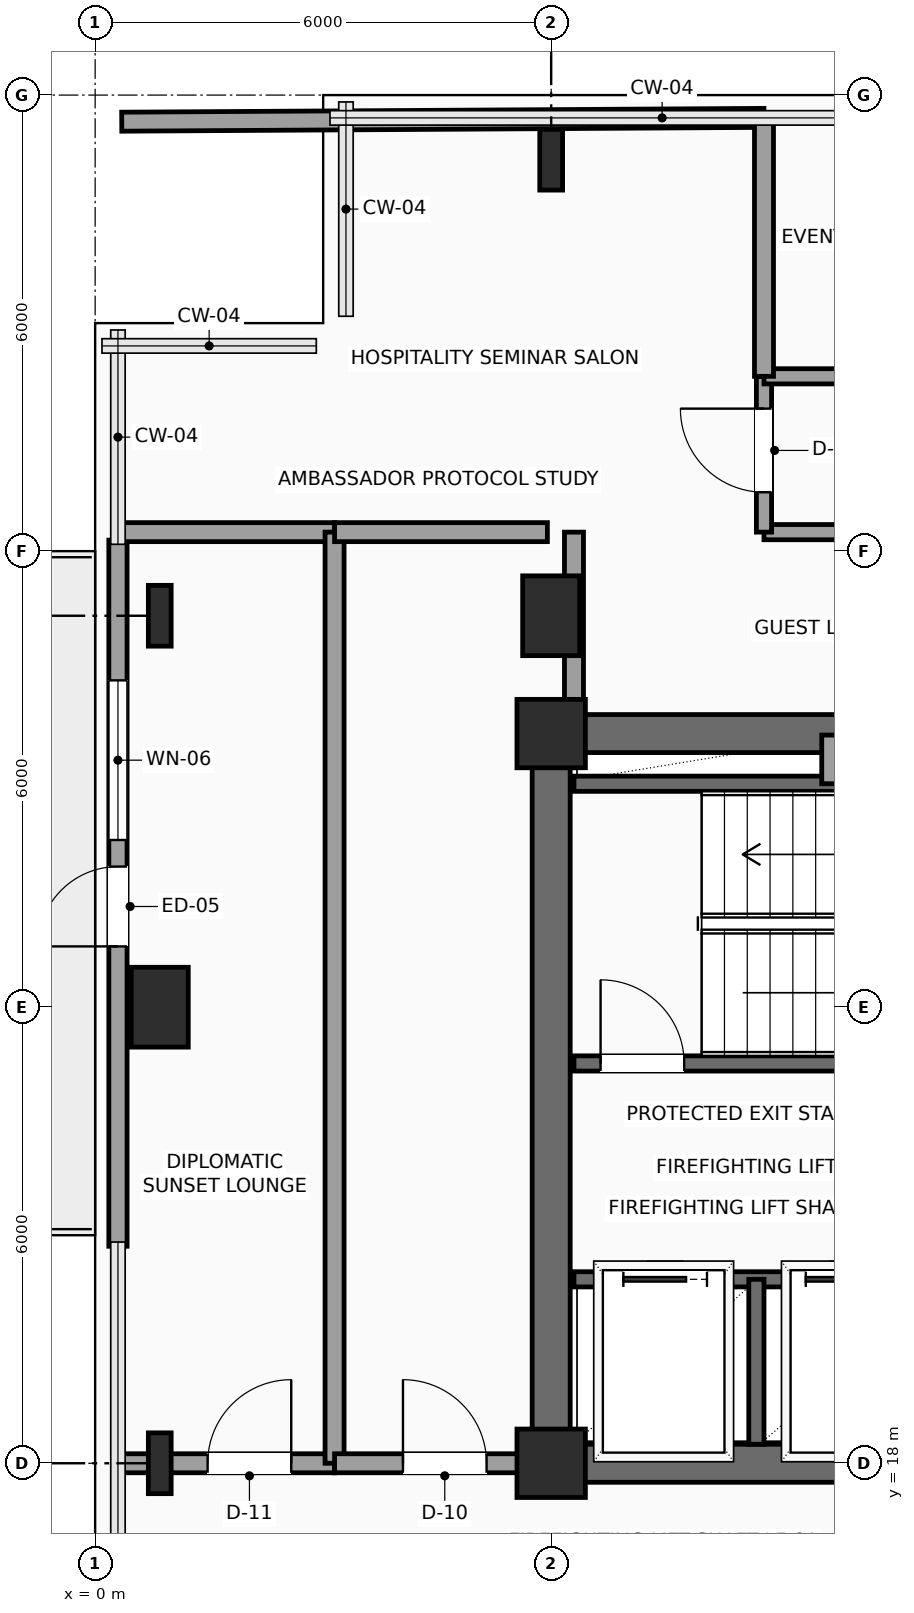
"""IFC4 building model, lengths in metres.
Left out: names, types, materials, properties, quantities, classifications, styles, units other than length and angle.
Written with IfcOpenShell. Run it as: python <this file> out.ifc"""

import sys

from ifc_helpers import new_model, si_unit, direction, frame, frame_2d, origin, origin_2d, place, context, subcontext, project, spatial, rectangle, i_section, extrude, element, fill, save


model = new_model("IFC4")
c1 = context("Model", 3, precision=1e-05, world=origin(), true_north=direction((0.0, 1.0)))
c2 = subcontext(c1, "Body", "Model", "MODEL_VIEW")
j1 = project(units=[si_unit("LENGTHUNIT", "METRE"), si_unit("PLANEANGLEUNIT", "RADIAN")], contexts=[c1])
p1 = place(None, origin())
s1 = spatial("IfcSite", under=j1, at=p1, CompositionType="ELEMENT")
p2 = place(p1, origin())
s2 = spatial("IfcBuilding", under=s1, at=p2, CompositionType="ELEMENT")
p3 = place(p2, frame((0.0, 0.0, 180.45)))
s3 = spatial("IfcBuildingStorey", under=s2, at=p3, CompositionType="ELEMENT", Elevation=180.45)
for number, where, z_axis, x_axis in (
    (1, (6.0, 18.0, 0.0), (0.0, 0.0, 1.0), (1.0, 0.0, 0.0)),
    (2, (6.0, 27.6, 0.0), (0.0, 0.0, 1.0), (1.0, 0.0, 0.0)),
):
    element("IfcColumn", number, at=place(p3, frame(where, z_axis=z_axis, x_axis=x_axis)), inside=s3, PredefinedType="COLUMN", context=c2, shape_type="SweptSolid", body=[
        extrude(rectangle(XDim=0.9, YDim=0.9, at=origin_2d()), origin(), (0.0, 0.0, 1.0), 3.75),
    ])
p4 = place(p3, frame((0.85, 18.0, 0.0), z_axis=(0.0, 0.0, 1.0), x_axis=(1.0, 0.0, 0.0)))
e3 = element("IfcColumn", 3, at=p4, inside=s3, PredefinedType="COLUMN", context=c2, shape_type="SweptSolid", body=[
    extrude(i_section(OverallWidth=0.3, OverallDepth=0.8, WebThickness=0.018, FlangeThickness=0.033, FilletRadius=0.03, at=origin_2d()), origin(), (0.0, 0.0, 1.0), 3.75),
])
p5 = place(p3, frame((0.85, 24.0, 0.0), z_axis=(0.0, 0.0, 1.0), x_axis=(1.0, 0.0, 0.0)))
e4 = element("IfcColumn", 4, at=p5, inside=s3, PredefinedType="COLUMN", context=c2, shape_type="SweptSolid", body=[
    extrude(rectangle(XDim=0.75, YDim=1.05, at=origin_2d()), origin(), (0.0, 0.0, 1.0), 3.75),
])
p6 = place(p3, frame((0.85, 29.15, 0.0), z_axis=(0.0, 0.0, 1.0), x_axis=(1.0, 0.0, 0.0)))
e5 = element("IfcColumn", 5, at=p6, inside=s3, PredefinedType="COLUMN", context=c2, shape_type="SweptSolid", body=[
    extrude(i_section(OverallWidth=0.3, OverallDepth=0.8, WebThickness=0.018, FlangeThickness=0.033, FilletRadius=0.03, at=origin_2d()), origin(), (0.0, 0.0, 1.0), 3.75),
])
p7 = place(p3, frame((6.0, 29.15, 0.0), z_axis=(0.0, 0.0, 1.0), x_axis=(1.0, 0.0, 0.0)))
e6 = element("IfcColumn", 6, at=p7, inside=s3, PredefinedType="COLUMN", context=c2, shape_type="SweptSolid", body=[
    extrude(rectangle(XDim=0.75, YDim=1.05, at=origin_2d()), origin(), (0.0, 0.0, 1.0), 3.75),
])
p8 = place(p3, frame((6.0, 35.15, 0.0), z_axis=(0.0, 0.0, 1.0), x_axis=(1.0, 0.0, 0.0)))
e7 = element("IfcColumn", 7, at=p8, inside=s3, PredefinedType="COLUMN", context=c2, shape_type="SweptSolid", body=[
    extrude(i_section(OverallWidth=0.3, OverallDepth=0.8, WebThickness=0.018, FlangeThickness=0.033, FilletRadius=0.03, at=origin_2d()), origin(), (0.0, 0.0, 1.0), 3.75),
])
p9 = place(p3, frame((0.3, 20.855, 0.0), z_axis=(0.0, 0.0, 1.0), x_axis=(0.0, 1.0, 0.0)))
e8 = element("IfcWall", 8, at=p9, inside=s3, PredefinedType="SOLIDWALL", context=c2, shape_type="SweptSolid", body=[
    extrude(rectangle(XDim=9.29, YDim=0.24, at=frame_2d((4.645, 0.0))), origin(), (0.0, 0.0, 1.0), 3.54),
])
p10 = place(p9, frame((3.945, 0.0, 0.0)))
e9 = element("IfcOpeningElement", 9, at=p10, cuts=e8, PredefinedType="OPENING", context=c2, shape_type="SweptSolid", body=[
    extrude(rectangle(XDim=1.05, YDim=2.2, at=frame_2d((0.525, 1.1))), frame((0.0, 0.13, 0.0), z_axis=(0.0, -1.0, 0.0), x_axis=(1.0, 0.0, 0.0)), (0.0, 0.0, 1.0), 0.26),
])
p11 = place(p9, frame((5.345, 0.0, 0.85)))
e10 = element("IfcOpeningElement", 10, at=p11, cuts=e8, PredefinedType="OPENING", context=c2, shape_type="SweptSolid", body=[
    extrude(rectangle(XDim=2.1, YDim=2.2, at=frame_2d((1.05, 1.1))), frame((0.0, 0.13, 0.0), z_axis=(0.0, -1.0, 0.0), x_axis=(1.0, 0.0, 0.0)), (0.0, 0.0, 1.0), 0.26),
])
p12 = place(p3, frame((6.0, 18.0, 0.0), z_axis=(0.0, 0.0, 1.0), x_axis=(1.0, 0.0, 0.0)))
e11 = element("IfcWall", 11, at=p12, inside=s3, PredefinedType="SHEAR", context=c2, shape_type="SweptSolid", body=[
    extrude(rectangle(XDim=12.0, YDim=0.5, at=frame_2d((6.0, 0.0))), origin(), (0.0, 0.0, 1.0), 3.54),
])
p13 = place(p12, frame((7.15, 0.0, 0.0)))
e12 = element("IfcOpeningElement", 12, at=p13, cuts=e11, PredefinedType="OPENING", context=c2, shape_type="SweptSolid", body=[
    extrude(rectangle(XDim=1.6, YDim=2.3, at=frame_2d((0.8, 1.15))), frame((0.0, 0.26, 0.0), z_axis=(0.0, -1.0, 0.0), x_axis=(1.0, 0.0, 0.0)), (0.0, 0.0, 1.0), 0.52),
])
p14 = place(p3, frame((6.0, 27.6, 0.0), z_axis=(0.0, 0.0, 1.0), x_axis=(1.0, 0.0, 0.0)))
e13 = element("IfcWall", 13, at=p14, inside=s3, PredefinedType="SHEAR", context=c2, shape_type="SweptSolid", body=[
    extrude(rectangle(XDim=12.0, YDim=0.5, at=frame_2d((6.0, 0.0))), origin(), (0.0, 0.0, 1.0), 3.54),
])
p15 = place(p14, frame((10.2, 0.0, 0.0)))
e14 = element("IfcOpeningElement", 14, at=p15, cuts=e13, PredefinedType="OPENING", context=c2, shape_type="SweptSolid", body=[
    extrude(rectangle(XDim=0.9, YDim=2.15, at=frame_2d((0.45, 1.075))), frame((0.0, 0.26, 0.0), z_axis=(0.0, -1.0, 0.0), x_axis=(1.0, 0.0, 0.0)), (0.0, 0.0, 1.0), 0.52),
])
p16 = place(p3, frame((6.0, 18.0, 0.0), z_axis=(0.0, 0.0, 1.0), x_axis=(0.0, 1.0, 0.0)))
e15 = element("IfcWall", 15, at=p16, inside=s3, PredefinedType="SHEAR", context=c2, shape_type="SweptSolid", body=[
    extrude(rectangle(XDim=9.6, YDim=0.5, at=frame_2d((4.8, 0.0))), origin(), (0.0, 0.0, 1.0), 3.54),
])
p17 = place(p3, frame((6.3, 23.26, 0.0), z_axis=(0.0, 0.0, 1.0), x_axis=(1.0, 0.0, 0.0)))
e16 = element("IfcWall", 16, at=p17, inside=s3, PredefinedType="SHEAR", context=c2, shape_type="SweptSolid", body=[
    extrude(rectangle(XDim=8.88, YDim=0.2, at=frame_2d((4.44, 0.0))), origin(), (0.0, 0.0, 1.0), 3.54),
])
p18 = place(p17, frame((0.35, 0.0, 0.0)))
e17 = element("IfcOpeningElement", 17, at=p18, cuts=e16, PredefinedType="OPENING", context=c2, shape_type="SweptSolid", body=[
    extrude(rectangle(XDim=1.1, YDim=2.2, at=frame_2d((0.55, 1.1))), frame((0.0, 0.11, 0.0), z_axis=(0.0, -1.0, 0.0), x_axis=(1.0, 0.0, 0.0)), (0.0, 0.0, 1.0), 0.22),
])
p19 = place(p3, frame((6.3, 26.94, 0.0), z_axis=(0.0, 0.0, 1.0), x_axis=(1.0, 0.0, 0.0)))
e18 = element("IfcWall", 18, at=p19, inside=s3, PredefinedType="SHEAR", context=c2, shape_type="SweptSolid", body=[
    extrude(rectangle(XDim=8.88, YDim=0.2, at=frame_2d((4.44, 0.0))), origin(), (0.0, 0.0, 1.0), 3.54),
])
p20 = place(p3, frame((6.3, 20.42, 0.0), z_axis=(0.0, 0.0, 1.0), x_axis=(1.0, 0.0, 0.0)))
e19 = element("IfcWall", 19, at=p20, inside=s3, PredefinedType="SHEAR", context=c2, shape_type="SweptSolid", body=[
    extrude(rectangle(XDim=4.95, YDim=0.2, at=frame_2d((2.475, 0.0))), origin(), (0.0, 0.0, 1.0), 3.54),
])
p21 = place(p20, frame((0.65, 0.0, 0.0)))
e20 = element("IfcOpeningElement", 20, at=p21, cuts=e19, PredefinedType="OPENING", context=c2, shape_type="SweptSolid", body=[
    extrude(rectangle(XDim=1.1, YDim=2.2, at=frame_2d((0.55, 1.1))), frame((0.0, 0.11, 0.0), z_axis=(0.0, -1.0, 0.0), x_axis=(1.0, 0.0, 0.0)), (0.0, 0.0, 1.0), 0.22),
])
p22 = place(p20, frame((3.05, 0.0, 0.0)))
e21 = element("IfcOpeningElement", 21, at=p22, cuts=e19, PredefinedType="OPENING", context=c2, shape_type="SweptSolid", body=[
    extrude(rectangle(XDim=1.1, YDim=2.2, at=frame_2d((0.55, 1.1))), frame((0.0, 0.11, 0.0), z_axis=(0.0, -1.0, 0.0), x_axis=(1.0, 0.0, 0.0)), (0.0, 0.0, 1.0), 0.22),
])
p23 = place(p3, frame((8.7, 18.25, 0.0), z_axis=(0.0, 0.0, 1.0), x_axis=(0.0, 1.0, 0.0)))
e22 = element("IfcWall", 22, at=p23, inside=s3, PredefinedType="SHEAR", context=c2, shape_type="SweptSolid", body=[
    extrude(rectangle(XDim=2.17, YDim=0.2, at=frame_2d((1.085, 0.0))), origin(), (0.0, 0.0, 1.0), 3.54),
])
p24 = place(p3, frame((9.66, 26.94, 0.0), z_axis=(0.0, 0.0, 1.0), x_axis=(0.0, 1.0, 0.0)))
e23 = element("IfcWall", 23, at=p24, inside=s3, PredefinedType="SOLIDWALL", context=c2, shape_type="SweptSolid", body=[
    extrude(rectangle(XDim=0.64, YDim=0.2, at=frame_2d((0.32, 0.0))), origin(), (0.0, 0.0, 1.0), 3.54),
])
p25 = place(p3, frame((15.88, 30.25, 0.0), z_axis=(0.0, 0.0, 1.0), x_axis=(-1.0, 0.0, 0.0)))
e24 = element("IfcWall", 24, at=p25, inside=s3, PredefinedType="SOLIDWALL", context=c2, shape_type="SweptSolid", body=[
    extrude(rectangle(XDim=7.08, YDim=0.2, at=frame_2d((3.54, 0.0))), origin(), (0.0, 0.0, 1.0), 3.54),
])
p26 = place(p25, frame((2.11, 0.0, 0.0)))
e25 = element("IfcOpeningElement", 25, at=p26, cuts=e24, PredefinedType="OPENING", context=c2, shape_type="SweptSolid", body=[
    extrude(rectangle(XDim=1.1, YDim=2.25, at=frame_2d((0.55, 1.125))), frame((0.0, 0.11, 0.0), z_axis=(0.0, -1.0, 0.0), x_axis=(1.0, 0.0, 0.0)), (0.0, 0.0, 1.0), 0.22),
])
p27 = place(p3, frame((8.8, 30.25, 0.0), z_axis=(0.0, 0.0, 1.0), x_axis=(0.0, 1.0, 0.0)))
e26 = element("IfcWall", 26, at=p27, inside=s3, PredefinedType="SOLIDWALL", context=c2, shape_type="SweptSolid", body=[
    extrude(rectangle(XDim=2.05, YDim=0.2, at=frame_2d((1.025, 0.0))), origin(), (0.0, 0.0, 1.0), 3.54),
])
p28 = place(p27, frame((0.525, 0.0, 0.0)))
e27 = element("IfcOpeningElement", 27, at=p28, cuts=e26, PredefinedType="OPENING", context=c2, shape_type="SweptSolid", body=[
    extrude(rectangle(XDim=1.1, YDim=2.25, at=frame_2d((0.55, 1.125))), frame((0.0, 0.11, 0.0), z_axis=(0.0, -1.0, 0.0), x_axis=(1.0, 0.0, 0.0)), (0.0, 0.0, 1.0), 0.22),
])
p29 = place(p3, frame((8.8, 32.3, 0.0), z_axis=(0.0, 0.0, 1.0), x_axis=(1.0, 0.0, 0.0)))
e28 = element("IfcWall", 28, at=p29, inside=s3, PredefinedType="SOLIDWALL", context=c2, shape_type="SweptSolid", body=[
    extrude(rectangle(XDim=6.2, YDim=0.2, at=frame_2d((3.1, 0.0))), origin(), (0.0, 0.0, 1.0), 3.132),
])
p30 = place(p29, frame((2.6, 0.0, 0.0)))
e29 = element("IfcOpeningElement", 29, at=p30, cuts=e28, PredefinedType="OPENING", context=c2, shape_type="SweptSolid", body=[
    extrude(rectangle(XDim=1.1, YDim=2.25, at=frame_2d((0.55, 1.125))), frame((0.0, 0.11, 0.0), z_axis=(0.0, -1.0, 0.0), x_axis=(1.0, 0.0, 0.0)), (0.0, 0.0, 1.0), 0.22),
])
p31 = place(p3, frame((0.3, 18.0, 0.0), z_axis=(0.0, 0.0, 1.0), x_axis=(1.0, 0.0, 0.0)))
e30 = element("IfcWall", 30, at=p31, inside=s3, PredefinedType="PARTITIONING", context=c2, shape_type="SweptSolid", body=[
    extrude(rectangle(XDim=2.85, YDim=0.25, at=frame_2d((1.425, 0.0))), origin(), (0.0, 0.0, 1.0), 3.132),
])
p32 = place(p31, frame((1.18, 0.0, 0.0)))
e31 = element("IfcOpeningElement", 31, at=p32, cuts=e30, PredefinedType="OPENING", context=c2, shape_type="SweptSolid", body=[
    extrude(rectangle(XDim=1.1, YDim=2.25, at=frame_2d((0.55, 1.125))), frame((0.0, 0.135, 0.0), z_axis=(0.0, -1.0, 0.0), x_axis=(1.0, 0.0, 0.0)), (0.0, 0.0, 1.0), 0.27),
])
p33 = place(p3, frame((0.3, 30.25, 0.0), z_axis=(0.0, 0.0, 1.0), x_axis=(1.0, 0.0, 0.0)))
e32 = element("IfcWall", 32, at=p33, inside=s3, PredefinedType="PARTITIONING", context=c2, shape_type="SweptSolid", body=[
    extrude(rectangle(XDim=2.85, YDim=0.25, at=frame_2d((1.425, 0.0))), origin(), (0.0, 0.0, 1.0), 3.54),
])
p34 = place(p3, frame((3.15, 18.0, 0.0), z_axis=(0.0, 0.0, 1.0), x_axis=(0.0, 1.0, 0.0)))
e33 = element("IfcWall", 33, at=p34, inside=s3, PredefinedType="PARTITIONING", context=c2, shape_type="SweptSolid", body=[
    extrude(rectangle(XDim=12.25, YDim=0.25, at=frame_2d((6.125, 0.0))), origin(), (0.0, 0.0, 1.0), 3.54),
])
p35 = place(p3, frame((3.15, 18.0, 0.0), z_axis=(0.0, 0.0, 1.0), x_axis=(1.0, 0.0, 0.0)))
e34 = element("IfcWall", 34, at=p35, inside=s3, PredefinedType="PARTITIONING", context=c2, shape_type="SweptSolid", body=[
    extrude(rectangle(XDim=2.8, YDim=0.25, at=frame_2d((1.4, 0.0))), origin(), (0.0, 0.0, 1.0), 3.132),
])
p36 = place(p35, frame((0.9, 0.0, 0.0)))
e35 = element("IfcOpeningElement", 35, at=p36, cuts=e34, PredefinedType="OPENING", context=c2, shape_type="SweptSolid", body=[
    extrude(rectangle(XDim=1.1, YDim=2.25, at=frame_2d((0.55, 1.125))), frame((0.0, 0.135, 0.0), z_axis=(0.0, -1.0, 0.0), x_axis=(1.0, 0.0, 0.0)), (0.0, 0.0, 1.0), 0.27),
])
p37 = place(p3, frame((3.15, 30.25, 0.0), z_axis=(0.0, 0.0, 1.0), x_axis=(1.0, 0.0, 0.0)))
e36 = element("IfcWall", 36, at=p37, inside=s3, PredefinedType="PARTITIONING", context=c2, shape_type="SweptSolid", body=[
    extrude(rectangle(XDim=2.8, YDim=0.25, at=frame_2d((1.4, 0.0))), origin(), (0.0, 0.0, 1.0), 3.54),
])
p38 = place(p3, frame((6.3, 27.65, 0.0), z_axis=(0.0, 0.0, 1.0), x_axis=(0.0, 1.0, 0.0)))
e37 = element("IfcWall", 37, at=p38, inside=s3, PredefinedType="PARTITIONING", context=c2, shape_type="SweptSolid", body=[
    extrude(rectangle(XDim=2.6, YDim=0.25, at=frame_2d((1.3, 0.0))), origin(), (0.0, 0.0, 1.0), 3.132),
])
p39 = place(p3, frame((0.35, 35.65, 0.0), z_axis=(0.0, 0.0, 1.0), x_axis=(0.99998245966, 0.005922868574, 0.0)))
e38 = element("IfcWall", 38, at=p39, inside=s3, PredefinedType="PARTITIONING", context=c2, shape_type="SweptSolid", body=[
    extrude(rectangle(XDim=8.45, YDim=0.25, at=frame_2d((4.225, 0.0))), origin(), (0.0, 0.0, 1.0), 3.54),
])
p40 = place(p3, frame((8.8, 32.3, 0.0), z_axis=(0.0, 0.0, 1.0), x_axis=(0.0, 1.0, 0.0)))
e39 = element("IfcWall", 39, at=p40, inside=s3, PredefinedType="PARTITIONING", context=c2, shape_type="SweptSolid", body=[
    extrude(rectangle(XDim=3.4, YDim=0.25, at=frame_2d((1.7, 0.0))), origin(), (0.0, 0.0, 1.0), 3.54),
])
p41 = place(p10, origin())
e40 = element("IfcDoor", 40, at=p41, inside=s3, OperationType="SINGLE_SWING_LEFT", PredefinedType="DOOR", context=c2, shape_type="SweptSolid", body=[
    extrude(rectangle(XDim=1.05, YDim=2.2, at=frame_2d((0.525, 1.1))), frame((0.0, 0.025, 0.0), z_axis=(0.0, -1.0, 0.0), x_axis=(1.0, 0.0, 0.0)), (0.0, 0.0, 1.0), 0.05),
])
fill(e9, e40)
p42 = place(p11, origin())
e41 = element("IfcWindow", 41, at=p42, inside=s3, PartitioningType="SINGLE_PANEL", PredefinedType="WINDOW", context=c2, shape_type="SweptSolid", body=[
    extrude(rectangle(XDim=2.1, YDim=2.2, at=frame_2d((1.05, 1.1))), frame((0.0, 0.03, 0.0), z_axis=(0.0, -1.0, 0.0), x_axis=(1.0, 0.0, 0.0)), (0.0, 0.0, 1.0), 0.06),
])
fill(e10, e41)
p43 = place(p18, origin())
e42 = element("IfcDoor", 42, at=p43, inside=s3, OperationType="SINGLE_SWING_LEFT", PredefinedType="DOOR", context=c2, shape_type="SweptSolid", body=[
    extrude(rectangle(XDim=1.1, YDim=2.2, at=frame_2d((0.55, 1.1))), frame((0.0, 0.025, 0.0), z_axis=(0.0, -1.0, 0.0), x_axis=(1.0, 0.0, 0.0)), (0.0, 0.0, 1.0), 0.05),
])
fill(e17, e42)
p44 = place(p21, origin())
e43 = element("IfcDoor", 43, at=p44, inside=s3, OperationType="SLIDING_TO_LEFT", PredefinedType="DOOR", context=c2, shape_type="SweptSolid", body=[
    extrude(rectangle(XDim=1.1, YDim=2.2, at=frame_2d((0.55, 1.1))), frame((0.0, 0.025, 0.0), z_axis=(0.0, -1.0, 0.0), x_axis=(1.0, 0.0, 0.0)), (0.0, 0.0, 1.0), 0.05),
])
fill(e20, e43)
p45 = place(p22, origin())
e44 = element("IfcDoor", 44, at=p45, inside=s3, OperationType="SLIDING_TO_LEFT", PredefinedType="DOOR", context=c2, shape_type="SweptSolid", body=[
    extrude(rectangle(XDim=1.1, YDim=2.2, at=frame_2d((0.55, 1.1))), frame((0.0, 0.025, 0.0), z_axis=(0.0, -1.0, 0.0), x_axis=(1.0, 0.0, 0.0)), (0.0, 0.0, 1.0), 0.05),
])
fill(e21, e44)
p46 = place(p28, origin())
e45 = element("IfcDoor", 45, at=p46, inside=s3, OperationType="SINGLE_SWING_RIGHT", PredefinedType="DOOR", context=c2, shape_type="SweptSolid", body=[
    extrude(rectangle(XDim=1.1, YDim=2.25, at=frame_2d((0.55, 1.125))), frame((0.0, 0.025, 0.0), z_axis=(0.0, -1.0, 0.0), x_axis=(1.0, 0.0, 0.0)), (0.0, 0.0, 1.0), 0.05),
])
fill(e27, e45)
p47 = place(p32, origin())
e46 = element("IfcDoor", 46, at=p47, inside=s3, OperationType="SINGLE_SWING_RIGHT", PredefinedType="DOOR", context=c2, shape_type="SweptSolid", body=[
    extrude(rectangle(XDim=1.1, YDim=2.25, at=frame_2d((0.55, 1.125))), frame((0.0, 0.025, 0.0), z_axis=(0.0, -1.0, 0.0), x_axis=(1.0, 0.0, 0.0)), (0.0, 0.0, 1.0), 0.05),
])
fill(e31, e46)
p48 = place(p36, origin())
e47 = element("IfcDoor", 47, at=p48, inside=s3, OperationType="SINGLE_SWING_LEFT", PredefinedType="DOOR", context=c2, shape_type="SweptSolid", body=[
    extrude(rectangle(XDim=1.1, YDim=2.25, at=frame_2d((0.55, 1.125))), frame((0.0, 0.025, 0.0), z_axis=(0.0, -1.0, 0.0), x_axis=(1.0, 0.0, 0.0)), (0.0, 0.0, 1.0), 0.05),
])
fill(e35, e47)
save(model, sys.argv[1])
